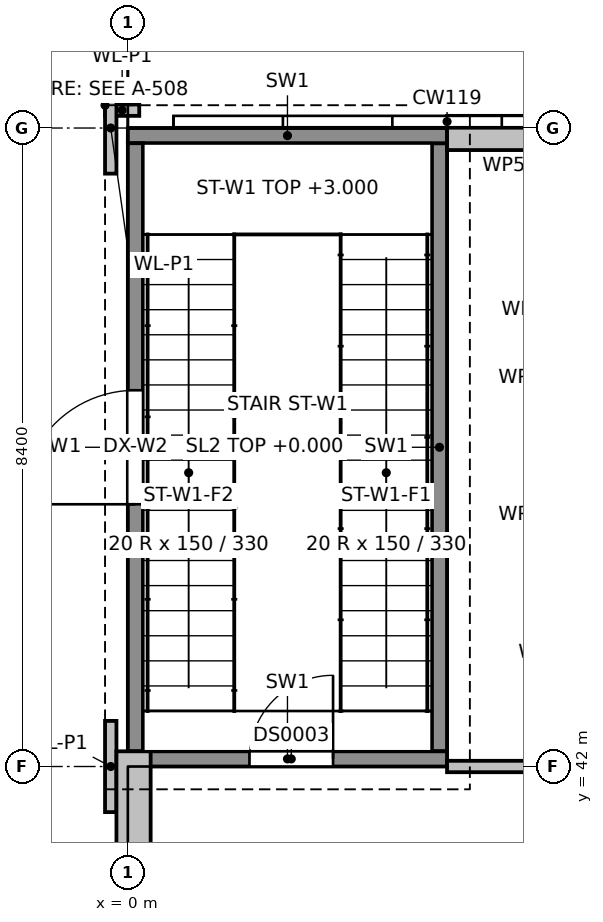
"""IFC4 building model, lengths in metres.
Left out: names, types, materials, properties, quantities, classifications, styles, units other than length and angle.
Written with IfcOpenShell. Run it as: python <this file> out.ifc"""

import sys

from ifc_helpers import new_model, si_unit, direction, frame, frame_2d, origin, place, context, subcontext, project, spatial, rectangle, extrude, element, fill, save


model = new_model("IFC4")
c1 = context("Model", 3, precision=1e-05, world=origin(), true_north=direction((0.0, 1.0)))
c2 = subcontext(c1, "Body", "Model", "MODEL_VIEW")
j1 = project(units=[si_unit("LENGTHUNIT", "METRE"), si_unit("PLANEANGLEUNIT", "RADIAN")], contexts=[c1])
p1 = place(None, origin())
s1 = spatial("IfcSite", under=j1, at=p1, CompositionType="ELEMENT")
p2 = place(p1, origin())
s2 = spatial("IfcBuilding", under=s1, at=p2, CompositionType="ELEMENT")
p3 = place(p2, origin())
s3 = spatial("IfcBuildingStorey", under=s2, at=p3, CompositionType="ELEMENT", Elevation=0.0)
p4 = place(p3, frame((0.0, 42.1, -1.35), z_axis=(0.0, 0.0, 1.0), x_axis=(1.0, 0.0, 0.0)))
e1 = element("IfcWall", 1, at=p4, inside=s3, PredefinedType="SHEAR", context=c2, shape_type="SweptSolid", body=[
    extrude(rectangle(XDim=4.2, YDim=0.2, at=frame_2d((2.1, 0.0))), origin(), (0.0, 0.0, 1.0), 7.35),
])
p5 = place(p4, frame((1.6, 0.0, 1.35)))
e2 = element("IfcOpeningElement", 2, at=p5, cuts=e1, PredefinedType="OPENING", context=c2, shape_type="SweptSolid", body=[
    extrude(rectangle(XDim=1.1, YDim=2.1, at=frame_2d((0.55, 1.05))), frame((0.0, 0.1, 0.0), z_axis=(0.0, -1.0, 0.0), x_axis=(1.0, 0.0, 0.0)), (0.0, 0.0, 1.0), 0.2),
])
p6 = place(p3, frame((0.0, 50.3, -1.35), z_axis=(0.0, 0.0, 1.0), x_axis=(1.0, 0.0, 0.0)))
e3 = element("IfcWall", 3, at=p6, inside=s3, PredefinedType="SHEAR", context=c2, shape_type="SweptSolid", body=[
    extrude(rectangle(XDim=4.2, YDim=0.2, at=frame_2d((2.1, 0.0))), origin(), (0.0, 0.0, 1.0), 7.35),
])
p7 = place(p3, frame((0.1, 42.2, -1.35), z_axis=(0.0, 0.0, 1.0), x_axis=(0.0, 1.0, 0.0)))
e4 = element("IfcWall", 4, at=p7, inside=s3, PredefinedType="SHEAR", context=c2, shape_type="SweptSolid", body=[
    extrude(rectangle(XDim=8.0, YDim=0.2, at=frame_2d((4.0, 0.0))), origin(), (0.0, 0.0, 1.0), 7.35),
])
p8 = place(p7, frame((3.25, 0.0, 1.35)))
e5 = element("IfcOpeningElement", 5, at=p8, cuts=e4, PredefinedType="OPENING", context=c2, shape_type="SweptSolid", body=[
    extrude(rectangle(XDim=1.5, YDim=2.4, at=frame_2d((0.75, 1.2))), frame((0.0, 0.1, 0.0), z_axis=(0.0, -1.0, 0.0), x_axis=(1.0, 0.0, 0.0)), (0.0, 0.0, 1.0), 0.2),
])
p9 = place(p3, frame((4.1, 42.2, -1.35), z_axis=(0.0, 0.0, 1.0), x_axis=(0.0, 1.0, 0.0)))
e6 = element("IfcWall", 6, at=p9, inside=s3, PredefinedType="SHEAR", context=c2, shape_type="SweptSolid", body=[
    extrude(rectangle(XDim=8.0, YDim=0.2, at=frame_2d((4.0, 0.0))), origin(), (0.0, 0.0, 1.0), 7.35),
])
p10 = place(p3, frame((0.075, 33.76, 0.0), z_axis=(0.0, 0.0, 1.0), x_axis=(0.0, 1.0, 0.0)))
e7 = element("IfcWall", 7, at=p10, inside=s3, PredefinedType="SOLIDWALL", context=c2, shape_type="SweptSolid", body=[
    extrude(rectangle(XDim=8.44, YDim=0.45, at=frame_2d((4.22, 0.0))), origin(), (0.0, 0.0, 1.0), 5.25),
])
p11 = place(p10, frame((2.84, 0.0, 0.0)))
e8 = element("IfcOpeningElement", 8, at=p11, cuts=e7, PredefinedType="OPENING", context=c2, shape_type="SweptSolid", body=[
    extrude(rectangle(XDim=2.4, YDim=2.4, at=frame_2d((1.2, 1.2))), frame((0.0, 0.225, 0.0), z_axis=(0.0, -1.0, 0.0), x_axis=(1.0, 0.0, 0.0)), (0.0, 0.0, 1.0), 0.45),
])
p12 = place(p10, frame((1.04, 0.0, 0.9)))
e9 = element("IfcOpeningElement", 9, at=p12, cuts=e7, PredefinedType="OPENING", context=c2, shape_type="SweptSolid", body=[
    extrude(rectangle(XDim=1.2, YDim=3.0, at=frame_2d((0.6, 1.5))), frame((0.0, 0.225, 0.0), z_axis=(0.0, -1.0, 0.0), x_axis=(1.0, 0.0, 0.0)), (0.0, 0.0, 1.0), 0.45),
])
p13 = place(p10, frame((5.84, 0.0, 0.9)))
e10 = element("IfcOpeningElement", 10, at=p13, cuts=e7, PredefinedType="OPENING", context=c2, shape_type="SweptSolid", body=[
    extrude(rectangle(XDim=1.2, YDim=3.0, at=frame_2d((0.6, 1.5))), frame((0.0, 0.225, 0.0), z_axis=(0.0, -1.0, 0.0), x_axis=(1.0, 0.0, 0.0)), (0.0, 0.0, 1.0), 0.45),
])
p14 = place(p3, frame((-0.225, 41.4, 0.0), z_axis=(0.0, 0.0, 1.0), x_axis=(0.0, 1.0, 0.0)))
e11 = element("IfcWall", 11, at=p14, inside=s3, PredefinedType="SOLIDWALL", context=c2, shape_type="SweptSolid", body=[
    extrude(rectangle(XDim=1.2, YDim=0.15, at=frame_2d((0.6, 0.0))), origin(), (0.0, 0.0, 1.0), 6.0),
])
p15 = place(p3, frame((-0.225, 49.8, 0.0), z_axis=(0.0, 0.0, 1.0), x_axis=(0.0, 1.0, 0.0)))
e12 = element("IfcWall", 12, at=p15, inside=s3, PredefinedType="SOLIDWALL", context=c2, shape_type="SweptSolid", body=[
    extrude(rectangle(XDim=1.2, YDim=0.15, at=frame_2d((0.6, 0.0))), origin(), (0.0, 0.0, 1.0), 6.0),
])
p16 = place(p3, frame((4.2, 50.335, 0.0), z_axis=(0.0, 0.0, 1.0), x_axis=(1.0, 0.0, 0.0)))
e13 = element("IfcWall", 13, at=p16, inside=s3, PredefinedType="SOLIDWALL", context=c2, shape_type="SweptSolid", body=[
    extrude(rectangle(XDim=4.05, YDim=0.45, at=frame_2d((2.025, 0.0))), origin(), (0.0, 0.0, 1.0), 5.25),
])
p17 = place(p3, frame((-0.3, 50.635, 0.0), z_axis=(0.0, 0.0, 1.0), x_axis=(1.0, 0.0, 0.0)))
e14 = element("IfcWall", 14, at=p17, inside=s3, PredefinedType="SOLIDWALL", context=c2, shape_type="SweptSolid", body=[
    extrude(rectangle(XDim=0.45, YDim=0.15, at=frame_2d((0.225, 0.0))), origin(), (0.0, 0.0, 1.0), 6.0),
])
p18 = place(p3, frame((4.2, 42.0, 0.0), z_axis=(0.0, 0.0, 1.0), x_axis=(1.0, 0.0, 0.0)))
e15 = element("IfcWall", 15, at=p18, inside=s3, PredefinedType="PARTITIONING", context=c2, shape_type="SweptSolid", body=[
    extrude(rectangle(XDim=4.05, YDim=0.15, at=frame_2d((2.025, 0.0))), origin(), (0.0, 0.0, 1.0), 5.87),
])
p19 = place(p18, frame((1.6, 0.0, 0.0)))
e16 = element("IfcOpeningElement", 16, at=p19, cuts=e15, PredefinedType="OPENING", context=c2, shape_type="SweptSolid", body=[
    extrude(rectangle(XDim=0.9, YDim=2.1, at=frame_2d((0.45, 1.05))), frame((0.0, 0.075, 0.0), z_axis=(0.0, -1.0, 0.0), x_axis=(1.0, 0.0, 0.0)), (0.0, 0.0, 1.0), 0.15),
])
p20 = place(p8, origin())
e17 = element("IfcDoor", 17, at=p20, inside=s3, OperationType="DOUBLE_DOOR_SINGLE_SWING", PredefinedType="DOOR", context=c2, shape_type="SweptSolid", body=[
    extrude(rectangle(XDim=1.5, YDim=2.4, at=frame_2d((0.75, 1.2))), frame((0.0, 0.025, 0.0), z_axis=(0.0, -1.0, 0.0), x_axis=(1.0, 0.0, 0.0)), (0.0, 0.0, 1.0), 0.05),
])
fill(e5, e17)
p21 = place(p5, frame((1.1, 0.05, 0.0), z_axis=(0.0, 0.0, 1.0), x_axis=(-1.0, 0.0, 0.0)))
e18 = element("IfcDoor", 18, at=p21, inside=s3, OperationType="SINGLE_SWING_RIGHT", PredefinedType="DOOR", context=c2, shape_type="SweptSolid", body=[
    extrude(rectangle(XDim=1.1, YDim=2.1, at=frame_2d((0.55, 1.05))), frame((0.0, 0.025, 0.0), z_axis=(0.0, -1.0, 0.0), x_axis=(1.0, 0.0, 0.0)), (0.0, 0.0, 1.0), 0.05),
])
fill(e2, e18)
save(model, sys.argv[1])
